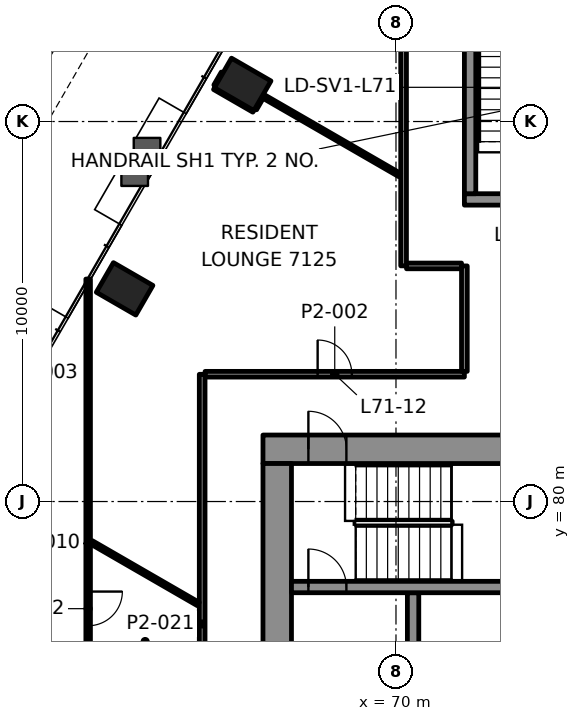
"""IFC4 building model, lengths in metres.
Left out: names, types, materials, properties, quantities, classifications, styles, units other than length and angle.
Written with IfcOpenShell. Run it as: python <this file> out.ifc"""

import sys

from ifc_helpers import new_model, si_unit, direction, frame, frame_2d, origin, origin_2d, place, context, subcontext, project, spatial, rectangle, hollow_rectangle, extrude, element, fill, save


model = new_model("IFC4")
c1 = context("Model", 3, precision=1e-05, world=origin(), true_north=direction((0.0, 1.0)))
c2 = subcontext(c1, "Body", "Model", "MODEL_VIEW")
j1 = project(units=[si_unit("LENGTHUNIT", "METRE"), si_unit("PLANEANGLEUNIT", "RADIAN")], contexts=[c1])
p1 = place(None, origin())
s1 = spatial("IfcSite", under=j1, at=p1, CompositionType="ELEMENT")
p2 = place(p1, origin())
s2 = spatial("IfcBuilding", under=s1, at=p2, CompositionType="ELEMENT")
p3 = place(p2, frame((0.0, 0.0, 295.1)))
s3 = spatial("IfcBuildingStorey", under=s2, at=p3, CompositionType="ELEMENT", Elevation=295.1)
for number, where, z_axis, x_axis in (
    (1, (65.966, 90.978, -0.0), (0.0, 0.0, 1.0), (-0.5, -0.866, 0.0)),
    (2, (62.859, 85.597, -0.0), (0.0, 0.0, 1.0), (-0.5, -0.866, 0.0)),
):
    element("IfcColumn", number, at=place(p3, frame(where, z_axis=z_axis, x_axis=x_axis)), inside=s3, PredefinedType="COLUMN", context=c2, shape_type="SweptSolid", body=[
        extrude(hollow_rectangle(XDim=0.9, YDim=1.2, WallThickness=0.06, at=origin_2d()), origin(), (0.0, 0.0, 1.0), 3.5),
    ])
p4 = place(p3, frame((66.5, 81.375, 0.0), z_axis=(0.0, 0.0, 1.0), x_axis=(1.0, 0.0, 0.0)))
e3 = element("IfcWall", 3, at=p4, inside=s3, PredefinedType="SHEAR", context=c2, shape_type="SweptSolid", body=[
    extrude(rectangle(XDim=17.0, YDim=0.75, at=frame_2d((8.5, 0.0))), origin(), (0.0, 0.0, 1.0), 3.3),
])
p5 = place(p4, frame((1.195, 0.0, 0.0)))
e4 = element("IfcOpeningElement", 4, at=p5, cuts=e3, PredefinedType="OPENING", context=c2, shape_type="SweptSolid", body=[
    extrude(rectangle(XDim=1.0, YDim=2.1, at=frame_2d((0.5, 1.05))), frame((0.0, 0.385, 0.0), z_axis=(0.0, -1.0, 0.0), x_axis=(1.0, 0.0, 0.0)), (0.0, 0.0, 1.0), 0.77),
])
p6 = place(p4, frame((15.005, 0.0, 0.0)))
e5 = element("IfcOpeningElement", 5, at=p6, cuts=e3, PredefinedType="OPENING", context=c2, shape_type="SweptSolid", body=[
    extrude(rectangle(XDim=1.0, YDim=2.1, at=frame_2d((0.5, 1.05))), frame((0.0, 0.385, 0.0), z_axis=(0.0, -1.0, 0.0), x_axis=(1.0, 0.0, 0.0)), (0.0, 0.0, 1.0), 0.77),
])
p7 = place(p4, frame((8.15, 0.0, 0.0)))
e6 = element("IfcOpeningElement", 6, at=p7, cuts=e3, PredefinedType="OPENING", context=c2, shape_type="SweptSolid", body=[
    extrude(rectangle(XDim=0.9, YDim=2.1, at=frame_2d((0.45, 1.05))), frame((0.0, 0.385, 0.0), z_axis=(0.0, -1.0, 0.0), x_axis=(1.0, 0.0, 0.0)), (0.0, 0.0, 1.0), 0.77),
])
p8 = place(p3, frame((66.875, 69.0, 0.0), z_axis=(0.0, 0.0, 1.0), x_axis=(0.0, 1.0, 0.0)))
e7 = element("IfcWall", 7, at=p8, inside=s3, PredefinedType="SHEAR", context=c2, shape_type="SweptSolid", body=[
    extrude(rectangle(XDim=12.0, YDim=0.75, at=frame_2d((6.0, 0.0))), origin(), (0.0, 0.0, 1.0), 3.3),
])
p9 = place(p8, frame((3.7, 0.0, 0.0)))
e8 = element("IfcOpeningElement", 8, at=p9, cuts=e7, PredefinedType="OPENING", context=c2, shape_type="SweptSolid", body=[
    extrude(rectangle(XDim=1.2, YDim=2.1, at=frame_2d((0.6, 1.05))), frame((0.0, 0.385, 0.0), z_axis=(0.0, -1.0, 0.0), x_axis=(1.0, 0.0, 0.0)), (0.0, 0.0, 1.0), 0.77),
])
p10 = place(p3, frame((70.45, 75.0, 0.0), z_axis=(0.0, 0.0, 1.0), x_axis=(0.0, 1.0, 0.0)))
e9 = element("IfcWall", 9, at=p10, inside=s3, PredefinedType="SHEAR", context=c2, shape_type="SweptSolid", body=[
    extrude(rectangle(XDim=2.6, YDim=0.3, at=frame_2d((1.3, 0.0))), origin(), (0.0, 0.0, 1.0), 3.3),
])
p11 = place(p10, frame((0.15, 0.0, 0.0)))
e10 = element("IfcOpeningElement", 10, at=p11, cuts=e9, PredefinedType="OPENING", context=c2, shape_type="SweptSolid", body=[
    extrude(rectangle(XDim=1.1, YDim=2.1, at=frame_2d((0.55, 1.05))), frame((0.0, 0.16, 0.0), z_axis=(0.0, -1.0, 0.0), x_axis=(1.0, 0.0, 0.0)), (0.0, 0.0, 1.0), 0.32),
])
p12 = place(p3, frame((67.25, 77.75, 0.0), z_axis=(0.0, 0.0, 1.0), x_axis=(1.0, 0.0, 0.0)))
e11 = element("IfcWall", 11, at=p12, inside=s3, PredefinedType="SHEAR", context=c2, shape_type="SweptSolid", body=[
    extrude(rectangle(XDim=15.5, YDim=0.3, at=frame_2d((7.75, 0.0))), origin(), (0.0, 0.0, 1.0), 3.3),
])
p13 = place(p12, frame((0.445, 0.0, 0.0)))
e12 = element("IfcOpeningElement", 12, at=p13, cuts=e11, PredefinedType="OPENING", context=c2, shape_type="SweptSolid", body=[
    extrude(rectangle(XDim=1.0, YDim=2.1, at=frame_2d((0.5, 1.05))), frame((0.0, 0.16, 0.0), z_axis=(0.0, -1.0, 0.0), x_axis=(1.0, 0.0, 0.0)), (0.0, 0.0, 1.0), 0.32),
])
p14 = place(p3, frame((71.8, 87.95, 0.0), z_axis=(0.0, 0.0, 1.0), x_axis=(1.0, 0.0, 0.0)))
e13 = element("IfcWall", 13, at=p14, inside=s3, PredefinedType="SHEAR", context=c2, shape_type="SweptSolid", body=[
    extrude(rectangle(XDim=6.4, YDim=0.3, at=frame_2d((3.2, 0.0))), origin(), (0.0, 0.0, 1.0), 3.3),
])
p15 = place(p14, frame((1.325, 0.0, 0.0)))
e14 = element("IfcOpeningElement", 14, at=p15, cuts=e13, PredefinedType="OPENING", context=c2, shape_type="SweptSolid", body=[
    extrude(rectangle(XDim=1.0, YDim=2.1, at=frame_2d((0.5, 1.05))), frame((0.0, 0.16, 0.0), z_axis=(0.0, -1.0, 0.0), x_axis=(1.0, 0.0, 0.0)), (0.0, 0.0, 1.0), 0.32),
])
p16 = place(p14, frame((4.125, 0.0, 0.0)))
e15 = element("IfcOpeningElement", 15, at=p16, cuts=e13, PredefinedType="OPENING", context=c2, shape_type="SweptSolid", body=[
    extrude(rectangle(XDim=1.2, YDim=2.1, at=frame_2d((0.6, 1.05))), frame((0.0, 0.16, 0.0), z_axis=(0.0, -1.0, 0.0), x_axis=(1.0, 0.0, 0.0)), (0.0, 0.0, 1.0), 0.32),
])
p17 = place(p3, frame((71.95, 88.1, 0.0), z_axis=(0.0, 0.0, 1.0), x_axis=(0.0, 1.0, 0.0)))
e16 = element("IfcWall", 16, at=p17, inside=s3, PredefinedType="SHEAR", context=c2, shape_type="SweptSolid", body=[
    extrude(rectangle(XDim=6.2, YDim=0.3, at=frame_2d((3.1, 0.0))), origin(), (0.0, 0.0, 1.0), 3.3),
])
p18 = place(p3, frame((64.977, 83.35, 0.0), z_axis=(0.0, 0.0, 1.0), x_axis=(1.0, 0.0, 0.0)))
e17 = element("IfcWall", 17, at=p18, inside=s3, PredefinedType="PARTITIONING", context=c2, shape_type="SweptSolid", body=[
    extrude(rectangle(XDim=6.823, YDim=0.15, at=frame_2d((3.412, 0.0))), origin(), (0.0, 0.0, 1.0), 2.7),
])
p19 = place(p18, frame((2.961, 0.0, 0.0)))
e18 = element("IfcOpeningElement", 18, at=p19, cuts=e17, PredefinedType="OPENING", context=c2, shape_type="SweptSolid", body=[
    extrude(rectangle(XDim=0.9, YDim=2.1, at=frame_2d((0.45, 1.05))), frame((0.0, 0.085, 0.0), z_axis=(0.0, -1.0, 0.0), x_axis=(1.0, 0.0, 0.0)), (0.0, 0.0, 1.0), 0.17),
])
p20 = place(p3, frame((70.277, 86.2, 0.0), z_axis=(0.0, 0.0, 1.0), x_axis=(1.0, 0.0, 0.0)))
e19 = element("IfcWall", 19, at=p20, inside=s3, PredefinedType="PARTITIONING", context=c2, shape_type="SweptSolid", body=[
    extrude(rectangle(XDim=1.448, YDim=0.15, at=frame_2d((0.724, 0.0))), origin(), (0.0, 0.0, 1.0), 2.7),
])
p21 = place(p3, frame((66.288, 90.333, 0.0), z_axis=(0.0, 0.0, 1.0), x_axis=(0.499620918551, 0.866244155967, 0.0)))
e20 = element("IfcWall", 20, at=p21, inside=s3, PredefinedType="PARTITIONING", context=c2, shape_type="SweptSolid", body=[
    extrude(rectangle(XDim=0.347, YDim=0.1, at=frame_2d((0.173, 0.0))), origin(), (0.0, 0.0, 1.0), 2.7),
])
p22 = place(p3, frame((65.251, 90.938, 0.0), z_axis=(0.0, 0.0, 1.0), x_axis=(0.500225704022, 0.865895054285, 0.0)))
e21 = element("IfcWall", 21, at=p22, inside=s3, PredefinedType="PARTITIONING", context=c2, shape_type="SweptSolid", body=[
    extrude(rectangle(XDim=0.392, YDim=0.1, at=frame_2d((0.196, 0.0))), origin(), (0.0, 0.0, 1.0), 2.7),
])
p23 = place(p3, frame((71.8, 83.425, 0.0), z_axis=(0.0, 0.0, 1.0), x_axis=(0.0, 1.0, 0.0)))
e22 = element("IfcWall", 22, at=p23, inside=s3, PredefinedType="PARTITIONING", context=c2, shape_type="SweptSolid", body=[
    extrude(rectangle(XDim=2.775, YDim=0.15, at=frame_2d((1.387, 0.0))), origin(), (0.0, 0.0, 1.0), 2.697),
])
p24 = place(p3, frame((70.2, 86.202, 0.0), z_axis=(0.0, 0.0, 1.0), x_axis=(0.0, 1.0, 0.0)))
e23 = element("IfcWall", 23, at=p24, inside=s3, PredefinedType="PARTITIONING", context=c2, shape_type="SweptSolid", body=[
    extrude(rectangle(XDim=9.998, YDim=0.15, at=frame_2d((4.999, 0.0))), origin(), (0.0, 0.0, 1.0), 2.7),
])
p25 = place(p3, frame((64.9, 70.208, 0.0), z_axis=(0.0, 0.0, 1.0), x_axis=(0.0, 1.0, 0.0)))
e24 = element("IfcWall", 24, at=p25, inside=s3, PredefinedType="PARTITIONING", context=c2, shape_type="SweptSolid", body=[
    extrude(rectangle(XDim=13.14, YDim=0.15, at=frame_2d((6.57, 0.0))), origin(), (0.0, 0.0, 1.0), 2.7),
])
p26 = place(p25, frame((4.743, 0.0, 0.0)))
e25 = element("IfcOpeningElement", 25, at=p26, cuts=e24, PredefinedType="OPENING", context=c2, shape_type="SweptSolid", body=[
    extrude(rectangle(XDim=1.0, YDim=2.1, at=frame_2d((0.5, 1.05))), frame((0.0, 0.085, 0.0), z_axis=(0.0, -1.0, 0.0), x_axis=(1.0, 0.0, 0.0)), (0.0, 0.0, 1.0), 0.17),
])
p27 = place(p3, frame((61.9, 85.855, 0.0), z_axis=(0.0, 0.0, 1.0), x_axis=(0.0, -1.0, 0.0)))
e26 = element("IfcWall", 26, at=p27, inside=s3, PredefinedType="PARTITIONING", context=c2, shape_type="SweptSolid", body=[
    extrude(rectangle(XDim=13.915, YDim=0.12, at=frame_2d((6.958, 0.0))), origin(), (0.0, 0.0, 1.0), 2.688),
])
p28 = place(p27, frame((8.224, 0.0, 0.0)))
e27 = element("IfcOpeningElement", 27, at=p28, cuts=e26, PredefinedType="OPENING", context=c2, shape_type="SweptSolid", body=[
    extrude(rectangle(XDim=0.9, YDim=2.1, at=frame_2d((0.45, 1.05))), frame((0.0, 0.07, 0.0), z_axis=(0.0, -1.0, 0.0), x_axis=(1.0, 0.0, 0.0)), (0.0, 0.0, 1.0), 0.14),
])
p29 = place(p27, frame((11.69, 0.0, 0.0)))
e28 = element("IfcOpeningElement", 28, at=p29, cuts=e26, PredefinedType="OPENING", context=c2, shape_type="SweptSolid", body=[
    extrude(rectangle(XDim=0.8, YDim=2.1, at=frame_2d((0.4, 1.05))), frame((0.0, 0.07, 0.0), z_axis=(0.0, -1.0, 0.0), x_axis=(1.0, 0.0, 0.0)), (0.0, 0.0, 1.0), 0.14),
])
p30 = place(p3, frame((70.099, 88.592, 0.0), z_axis=(0.0, 0.0, 1.0), x_axis=(-0.866045268016, 0.499965592563, 0.0)))
e29 = element("IfcWall", 29, at=p30, inside=s3, PredefinedType="PARTITIONING", context=c2, shape_type="SweptSolid", body=[
    extrude(rectangle(XDim=4.172, YDim=0.1, at=frame_2d((2.086, 0.0))), origin(), (0.0, 0.0, 1.0), 2.7),
])
p31 = place(p3, frame((66.258, 90.29, 0.0), z_axis=(0.0, 0.0, 1.0), x_axis=(-0.866032345022, 0.499987977232, 0.0)))
e30 = element("IfcWall", 30, at=p31, inside=s3, PredefinedType="PARTITIONING", context=c2, shape_type="SweptSolid", body=[
    extrude(rectangle(XDim=1.194, YDim=0.1, at=frame_2d((0.597, 0.0))), origin(), (0.0, 0.0, 1.0), 2.688),
])
p32 = place(p3, frame((64.799, 77.302, 0.0), z_axis=(0.0, 0.0, 1.0), x_axis=(-0.866000336211, 0.500043415797, 0.0)))
e31 = element("IfcWall", 31, at=p32, inside=s3, PredefinedType="PARTITIONING", context=c2, shape_type="SweptSolid", body=[
    extrude(rectangle(XDim=3.248, YDim=0.1, at=frame_2d((1.624, 0.0))), origin(), (0.0, 0.0, 1.0), 2.7),
])
p33 = place(p3, frame((69.117, 105.135, 0.0), z_axis=(0.0, 0.0, 1.0), x_axis=(-0.500000972034, -0.86602484258, 0.0)))
e32 = element("IfcWall", 32, at=p33, inside=s3, PredefinedType="SOLIDWALL", context=c2, shape_type="SweptSolid", body=[
    extrude(rectangle(XDim=26.734, YDim=0.8, at=frame_2d((13.367, 0.0))), origin(), (0.0, 0.0, 1.0), 0.9),
])
p34 = place(p19, origin())
e33 = element("IfcDoor", 33, at=p34, inside=s3, OperationType="SINGLE_SWING_RIGHT", PredefinedType="DOOR", context=c2, shape_type="SweptSolid", body=[
    extrude(rectangle(XDim=0.9, YDim=2.1, at=frame_2d((0.45, 1.05))), frame((0.0, 0.025, 0.0), z_axis=(0.0, -1.0, 0.0), x_axis=(1.0, 0.0, 0.0)), (0.0, 0.0, 1.0), 0.05),
])
fill(e18, e33)
p35 = place(p28, origin())
e34 = element("IfcDoor", 34, at=p35, inside=s3, OperationType="SINGLE_SWING_RIGHT", PredefinedType="DOOR", context=c2, shape_type="SweptSolid", body=[
    extrude(rectangle(XDim=0.9, YDim=2.1, at=frame_2d((0.45, 1.05))), frame((0.0, 0.025, 0.0), z_axis=(0.0, -1.0, 0.0), x_axis=(1.0, 0.0, 0.0)), (0.0, 0.0, 1.0), 0.05),
])
fill(e27, e34)
p36 = place(p13, origin())
e35 = element("IfcDoor", 35, at=p36, inside=s3, OperationType="SINGLE_SWING_LEFT", PredefinedType="DOOR", context=c2, shape_type="SweptSolid", body=[
    extrude(rectangle(XDim=1.0, YDim=2.1, at=frame_2d((0.5, 1.05))), frame((0.0, 0.025, 0.0), z_axis=(0.0, -1.0, 0.0), x_axis=(1.0, 0.0, 0.0)), (0.0, 0.0, 1.0), 0.05),
])
fill(e12, e35)
p37 = place(p5, origin())
e36 = element("IfcDoor", 36, at=p37, inside=s3, OperationType="SINGLE_SWING_RIGHT", PredefinedType="DOOR", context=c2, shape_type="SweptSolid", body=[
    extrude(rectangle(XDim=1.0, YDim=2.1, at=frame_2d((0.5, 1.05))), frame((0.0, 0.095, 0.0), z_axis=(0.0, -1.0, 0.0), x_axis=(1.0, 0.0, 0.0)), (0.0, 0.0, 1.0), 0.19),
])
fill(e4, e36)
save(model, sys.argv[1])
